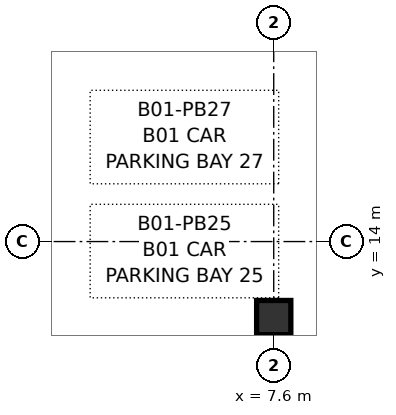
"""IFC4 building model, lengths in metres.
Left out: names, types, materials, properties, quantities, classifications, styles, units other than length and angle.
Written with IfcOpenShell. Run it as: python <this file> out.ifc"""

import sys

from ifc_helpers import new_model, si_unit, direction, frame, origin, origin_2d, place, context, subcontext, project, spatial, rectangle, extrude, source, transform, mapped, element, save


model = new_model("IFC4")
c1 = context("Model", 3, precision=1e-05, world=origin(), true_north=direction((0.0, 1.0)))
c2 = subcontext(c1, "Body", "Model", "MODEL_VIEW")
j1 = project(units=[si_unit("LENGTHUNIT", "METRE"), si_unit("PLANEANGLEUNIT", "RADIAN")], contexts=[c1])
p1 = place(None, origin())
s1 = spatial("IfcSite", under=j1, at=p1, CompositionType="ELEMENT")
p2 = place(p1, origin())
s2 = spatial("IfcBuilding", under=s1, at=p2, CompositionType="ELEMENT")
p3 = place(p2, frame((0.0, 0.0, -4.2)))
s3 = spatial("IfcBuildingStorey", under=s2, at=p3, CompositionType="ELEMENT", Elevation=-4.2)
m1 = source(origin(), c2, "Body", "SweptSolid", [
    extrude(rectangle(XDim=0.9, YDim=0.9, at=origin_2d()), origin(), (0.0, 0.0, 1.0), 3.985),
])
p4 = place(p3, frame((7.6, 12.0, 0.0), z_axis=(0.0, 0.0, 1.0), x_axis=(1.0, 0.0, 0.0)))
e1 = element("IfcColumn", 1, at=p4, inside=s3, PredefinedType="COLUMN", context=c2, shape_type="MappedRepresentation", body=[
    mapped(m1, transform((0.0, 0.0, 0.0), x_axis=(1.0, 0.0, 0.0), y_axis=(0.0, 1.0, 0.0), z_axis=(0.0, 0.0, 1.0), scale=1.0)),
])
save(model, sys.argv[1])
